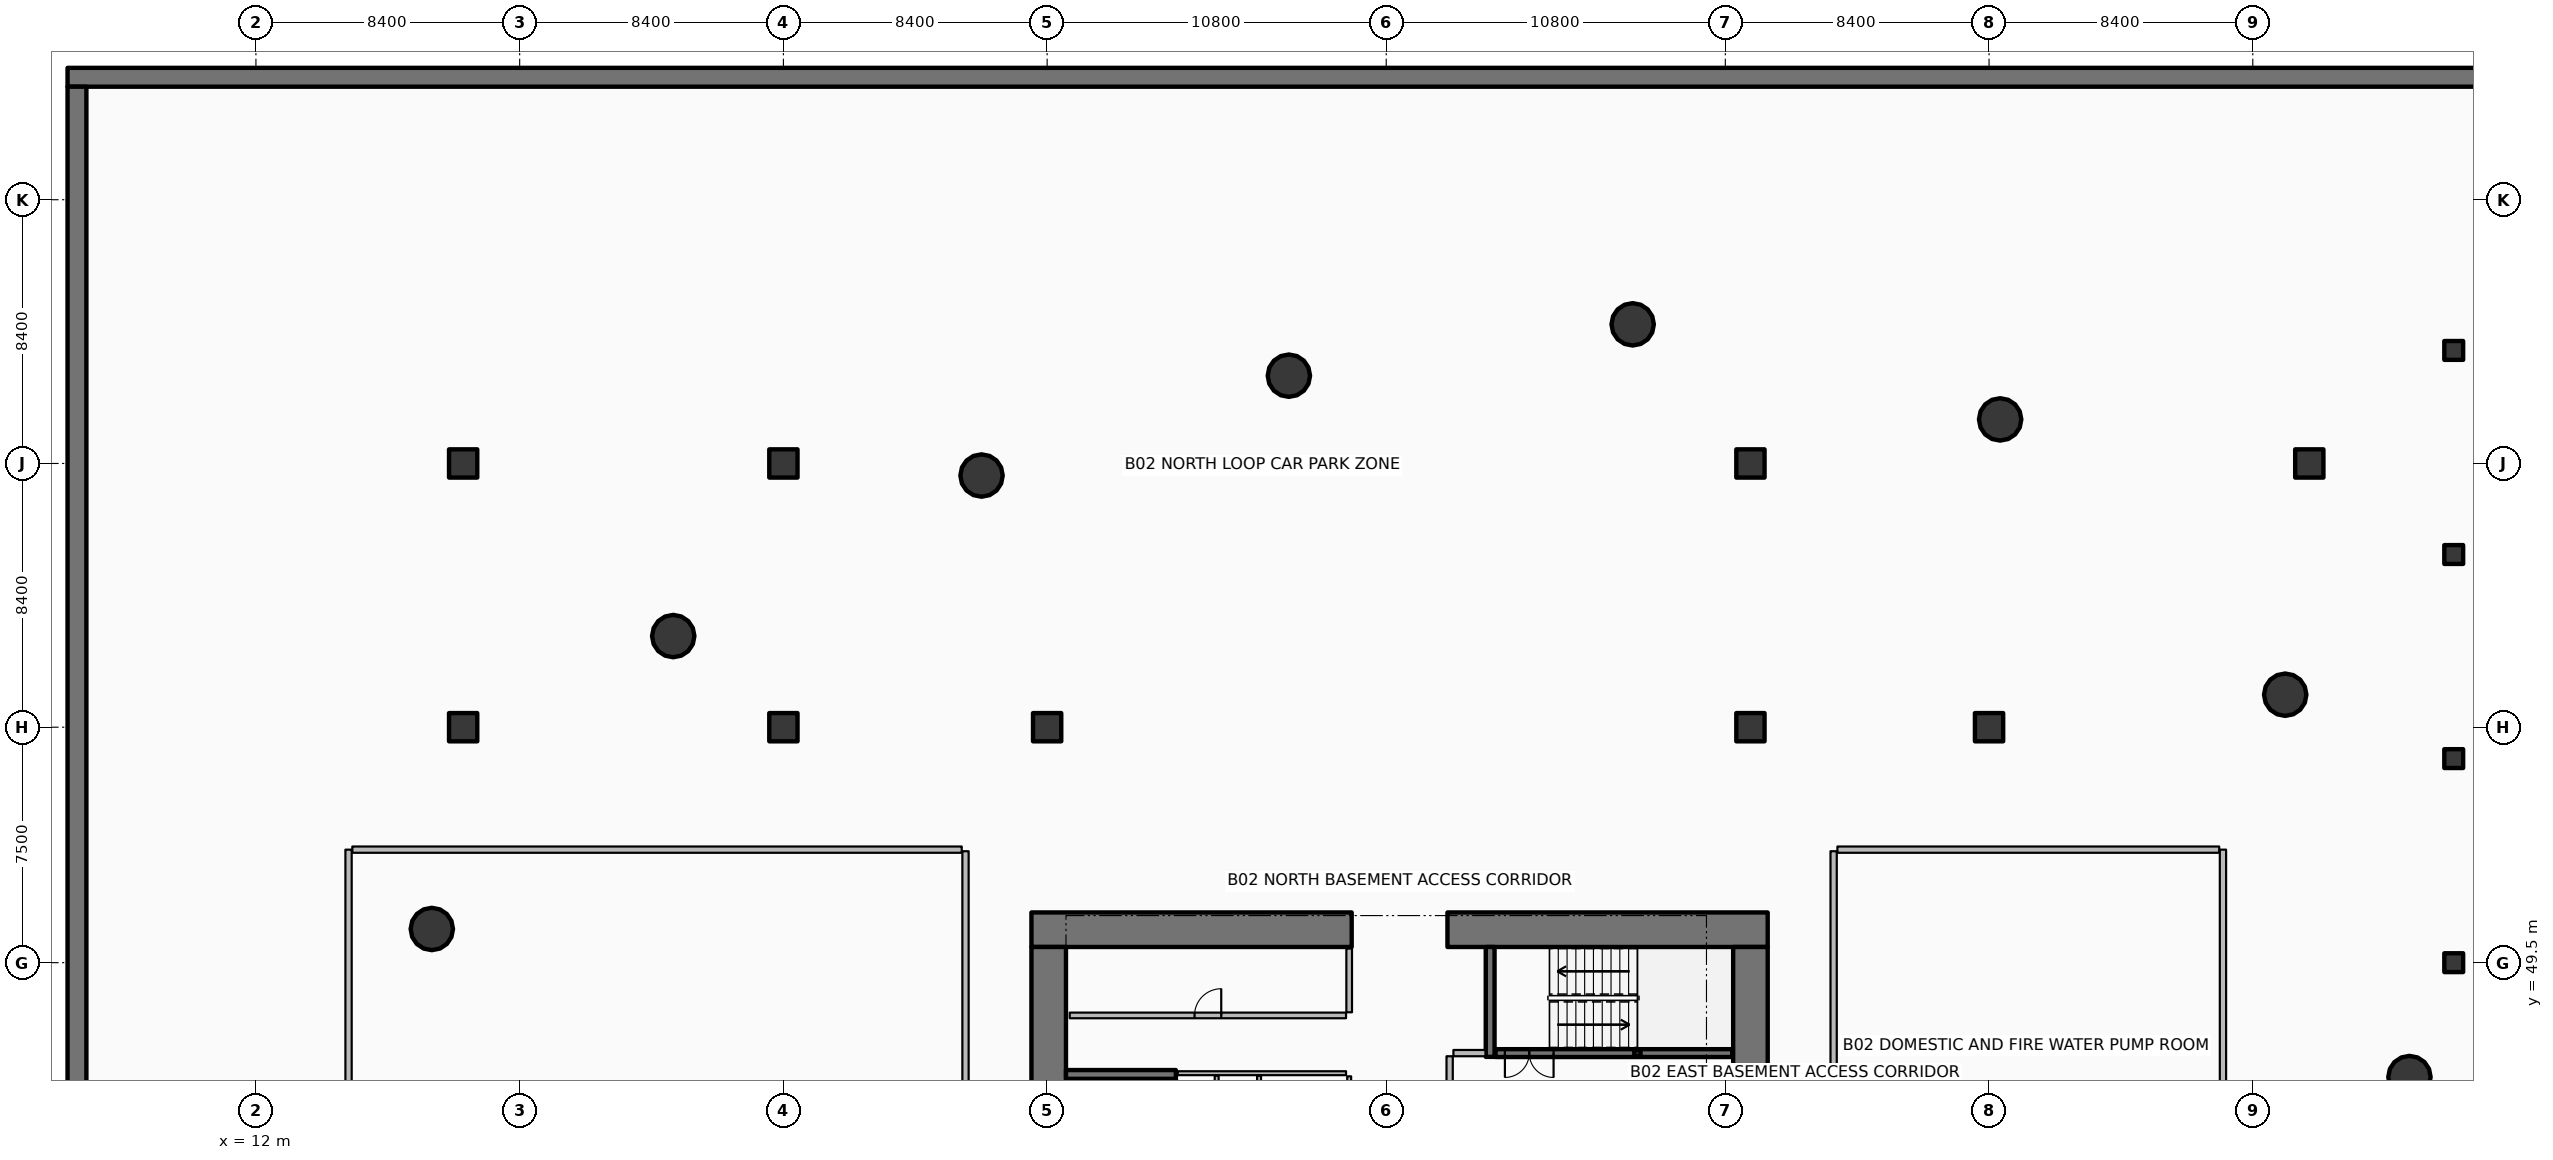
"""IFC4 building model, lengths in metres.
Left out: names, types, materials, properties, quantities, classifications, styles, units other than length and angle.
Written with IfcOpenShell. Run it as: python <this file> out.ifc"""

import sys

from ifc_helpers import new_model, si_unit, direction, frame, frame_2d, origin, origin_2d, place, context, subcontext, project, spatial, rectangle, hollow_rectangle, circle, extrude, element, fill, save


model = new_model("IFC4")
c1 = context("Model", 3, precision=1e-05, world=origin(), true_north=direction((0.0, 1.0)))
c2 = subcontext(c1, "Body", "Model", "MODEL_VIEW")
j1 = project(units=[si_unit("LENGTHUNIT", "METRE"), si_unit("PLANEANGLEUNIT", "RADIAN")], contexts=[c1])
p1 = place(None, origin())
s1 = spatial("IfcSite", under=j1, at=p1, CompositionType="ELEMENT")
p2 = place(p1, origin())
s2 = spatial("IfcBuilding", under=s1, at=p2, CompositionType="ELEMENT")
p3 = place(p2, frame((0.0, 0.0, -7.6)))
s3 = spatial("IfcBuildingStorey", under=s2, at=p3, CompositionType="ELEMENT", Elevation=-7.6)
p4 = place(p3, frame((6.0, 77.7, 0.0), z_axis=(0.0, 0.0, 1.0), x_axis=(1.0, 0.0, 0.0)))
e1 = element("IfcWall", 1, at=p4, inside=s3, PredefinedType="USERDEFINED", context=c2, shape_type="SweptSolid", body=[
    extrude(rectangle(XDim=84.0, YDim=0.6, at=frame_2d((42.0, 0.0))), origin(), (0.0, 0.0, 1.0), 3.8),
])
p5 = place(p3, frame((6.3, 6.6, 0.0), z_axis=(0.0, 0.0, 1.0), x_axis=(0.0, 1.0, 0.0)))
e2 = element("IfcWall", 2, at=p5, inside=s3, PredefinedType="USERDEFINED", context=c2, shape_type="SweptSolid", body=[
    extrude(rectangle(XDim=70.8, YDim=0.6, at=frame_2d((35.4, 0.0))), origin(), (0.0, 0.0, 1.0), 3.8),
])
for number, where, z_axis, x_axis in (
    (3, (18.6, 57.0, 0.0), (0.0, 0.0, 1.0), (1.0, 0.0, 0.0)),
    (4, (18.6, 65.4, 0.0), (0.0, 0.0, 1.0), (1.0, 0.0, 0.0)),
    (5, (28.8, 57.0, 0.0), (0.0, 0.0, 1.0), (1.0, 0.0, 0.0)),
    (6, (28.8, 65.4, 0.0), (0.0, 0.0, 1.0), (1.0, 0.0, 0.0)),
    (7, (37.2, 57.0, 0.0), (0.0, 0.0, 1.0), (1.0, 0.0, 0.0)),
    (8, (59.6, 57.0, 0.0), (0.0, 0.0, 1.0), (1.0, 0.0, 0.0)),
    (9, (59.6, 65.4, 0.0), (0.0, 0.0, 1.0), (1.0, 0.0, 0.0)),
    (10, (67.2, 57.0, 0.0), (0.0, 0.0, 1.0), (1.0, 0.0, 0.0)),
    (11, (77.4, 65.4, 0.0), (0.0, 0.0, 1.0), (1.0, 0.0, 0.0)),
):
    element("IfcColumn", number, at=place(p3, frame(where, z_axis=z_axis, x_axis=x_axis)), inside=s3, PredefinedType="COLUMN", context=c2, shape_type="SweptSolid", body=[
        extrude(rectangle(XDim=0.9, YDim=0.9, at=origin_2d()), origin(), (0.0, 0.0, 1.0), 3.52),
    ])
for number, where, z_axis, x_axis in (
    (12, (82.0, 49.5, 0.0), (0.0, 0.0, 1.0), (1.0, 0.0, 0.0)),
    (13, (82.0, 56.0, 0.0), (0.0, 0.0, 1.0), (1.0, 0.0, 0.0)),
    (14, (82.0, 62.5, 0.0), (0.0, 0.0, 1.0), (1.0, 0.0, 0.0)),
    (15, (82.0, 69.0, 0.0), (0.0, 0.0, 1.0), (1.0, 0.0, 0.0)),
):
    element("IfcColumn", number, at=place(p3, frame(where, z_axis=z_axis, x_axis=x_axis)), inside=s3, PredefinedType="COLUMN", context=c2, shape_type="SweptSolid", body=[
        extrude(rectangle(XDim=0.6, YDim=0.6, at=origin_2d()), origin(), (0.0, 0.0, 1.0), 3.52),
    ])
for number, where, z_axis, x_axis in (
    (16, (36.7, 50.55, 0.0), (0.0, 0.0, 1.0), (1.0, 0.0, 0.0)),
    (17, (49.95, 50.55, 0.0), (0.0, 0.0, 1.0), (1.0, 0.0, 0.0)),
):
    element("IfcWall", number, at=place(p3, frame(where, z_axis=z_axis, x_axis=x_axis)), inside=s3, PredefinedType="SHEAR", context=c2, shape_type="SweptSolid", body=[
        extrude(rectangle(XDim=10.2, YDim=1.1, at=frame_2d((5.1, 0.0))), origin(), (0.0, 0.0, 1.0), 3.8),
    ])
for number, where, z_axis, x_axis in (
    (18, (37.25, 34.0, 0.0), (0.0, 0.0, 1.0), (0.0, 1.0, 0.0)),
    (19, (59.6, 34.0, 0.0), (0.0, 0.0, 1.0), (0.0, 1.0, 0.0)),
):
    element("IfcWall", number, at=place(p3, frame(where, z_axis=z_axis, x_axis=x_axis)), inside=s3, PredefinedType="SHEAR", context=c2, shape_type="SweptSolid", body=[
        extrude(rectangle(XDim=16.0, YDim=1.1, at=frame_2d((8.0, 0.0))), origin(), (0.0, 0.0, 1.0), 3.8),
    ])
for number, where, z_axis, x_axis in (
    (20, (37.8, 45.94, 0.0), (0.0, 0.0, 1.0), (1.0, 0.0, 0.0)),
    (21, (51.31, 46.5, 0.0), (0.0, 0.0, 1.0), (0.0, 1.0, 0.0)),
):
    element("IfcWall", number, at=place(p3, frame(where, z_axis=z_axis, x_axis=x_axis)), inside=s3, PredefinedType="SHEAR", context=c2, shape_type="SweptSolid", body=[
        extrude(rectangle(XDim=3.5, YDim=0.28, at=frame_2d((1.75, 0.0))), origin(), (0.0, 0.0, 1.0), 3.8),
    ])
p6 = place(p3, frame((56.0, 46.62, 0.0), z_axis=(0.0, 0.0, 1.0), x_axis=(1.0, 0.0, 0.0)))
e22 = element("IfcColumn", 22, at=p6, inside=s3, PredefinedType="COLUMN", context=c2, shape_type="SweptSolid", body=[
    extrude(hollow_rectangle(XDim=0.2, YDim=0.2, WallThickness=0.01, InnerFilletRadius=0.01, OuterFilletRadius=0.02, at=origin_2d()), origin(), (0.0, 0.0, 1.0), 1.695),
])
for number, where, z_axis, x_axis in (
    (23, (76.633, 58.035, 0.0), (0.0, 0.0, 1.0), (1.0, 0.0, 0.0)),
    (24, (67.553, 66.803, 0.0), (0.0, 0.0, 1.0), (1.0, 0.0, 0.0)),
    (25, (55.849, 69.831, 0.0), (0.0, 0.0, 1.0), (1.0, 0.0, 0.0)),
    (26, (44.899, 68.196, 0.0), (0.0, 0.0, 1.0), (1.0, 0.0, 0.0)),
    (27, (35.111, 65.016, 0.0), (0.0, 0.0, 1.0), (1.0, 0.0, 0.0)),
    (28, (25.291, 59.902, 0.0), (0.0, 0.0, 1.0), (1.0, 0.0, 0.0)),
    (29, (17.602, 50.573, 0.0), (0.0, 0.0, 1.0), (1.0, 0.0, 0.0)),
    (30, (80.59, 45.857, 0.0), (0.0, 0.0, 1.0), (1.0, 0.0, 0.0)),
):
    element("IfcColumn", number, at=place(p3, frame(where, z_axis=z_axis, x_axis=x_axis)), inside=s3, PredefinedType="COLUMN", context=c2, shape_type="SweptSolid", body=[
        extrude(circle(Radius=0.675, at=origin_2d()), origin(), (0.0, 0.0, 1.0), 3.52),
    ])
p7 = place(p3, frame((41.18, 38.22, 0.0), z_axis=(0.0, 0.0, 1.0), x_axis=(0.0, 1.0, 0.0)))
e31 = element("IfcWall", 31, at=p7, inside=s3, PredefinedType="SOLIDWALL", context=c2, shape_type="SweptSolid", body=[
    extrude(rectangle(XDim=7.56, YDim=0.25, at=frame_2d((3.78, 0.0))), origin(), (0.0, 0.0, 1.0), 3.52),
])
p8 = place(p7, frame((0.3, 0.0, 0.0)))
e32 = element("IfcOpeningElement", 32, at=p8, cuts=e31, PredefinedType="OPENING", context=c2, shape_type="SweptSolid", body=[
    extrude(rectangle(XDim=1.55, YDim=2.15, at=frame_2d((0.775, 1.075))), frame((0.0, 0.135, 0.0), z_axis=(0.0, -1.0, 0.0), x_axis=(1.0, 0.0, 0.0)), (0.0, 0.0, 1.0), 0.27),
])
p9 = place(p3, frame((51.48, 46.62, 0.0), z_axis=(0.0, 0.0, 1.0), x_axis=(1.0, 0.0, 0.0)))
e33 = element("IfcWall", 33, at=p9, inside=s3, PredefinedType="SOLIDWALL", context=c2, shape_type="SweptSolid", body=[
    extrude(rectangle(XDim=7.54, YDim=0.25, at=frame_2d((3.77, 0.0))), origin(), (0.0, 0.0, 1.0), 3.52),
])
p10 = place(p9, frame((0.3, 0.0, 0.0)))
e34 = element("IfcOpeningElement", 34, at=p10, cuts=e33, PredefinedType="OPENING", context=c2, shape_type="SweptSolid", body=[
    extrude(rectangle(XDim=1.55, YDim=2.15, at=frame_2d((0.775, 1.075))), frame((0.0, 0.135, 0.0), z_axis=(0.0, -1.0, 0.0), x_axis=(1.0, 0.0, 0.0)), (0.0, 0.0, 1.0), 0.27),
])
p11 = place(p3, frame((56.62, 46.08, 0.0), z_axis=(0.0, 0.0, 1.0), x_axis=(0.0, -1.0, 0.0)))
e35 = element("IfcWall", 35, at=p11, inside=s3, PredefinedType="PARTITIONING", context=c2, shape_type="SweptSolid", body=[
    extrude(rectangle(XDim=2.46, YDim=0.16, at=frame_2d((1.23, 0.0))), origin(), (0.0, 0.0, 1.0), 3.52),
])
p12 = place(p11, frame((0.68, 0.0, 0.0)))
e36 = element("IfcOpeningElement", 36, at=p12, cuts=e35, PredefinedType="OPENING", context=c2, shape_type="SweptSolid", body=[
    extrude(rectangle(XDim=1.1, YDim=2.1, at=frame_2d((0.55, 1.05))), frame((0.0, 0.09, 0.0), z_axis=(0.0, -1.0, 0.0), x_axis=(1.0, 0.0, 0.0)), (0.0, 0.0, 1.0), 0.18),
])
p13 = place(p3, frame((56.72, 46.08, 0.0), z_axis=(0.0, 0.0, 1.0), x_axis=(1.0, 0.0, 0.0)))
e37 = element("IfcWall", 37, at=p13, inside=s3, PredefinedType="PARTITIONING", context=c2, shape_type="SweptSolid", body=[
    extrude(rectangle(XDim=2.06, YDim=0.16, at=frame_2d((1.03, 0.0))), origin(), (0.0, 0.0, 1.0), 3.52),
])
p14 = place(p3, frame((37.92, 47.82, 0.0), z_axis=(0.0, 0.0, 1.0), x_axis=(1.0, 0.0, 0.0)))
e38 = element("IfcWall", 38, at=p14, inside=s3, PredefinedType="PARTITIONING", context=c2, shape_type="SweptSolid", body=[
    extrude(rectangle(XDim=8.8, YDim=0.18, at=frame_2d((4.4, 0.0))), origin(), (0.0, 0.0, 1.0), 3.52),
])
p15 = place(p14, frame((3.975, 0.0, 0.0)))
e39 = element("IfcOpeningElement", 39, at=p15, cuts=e38, PredefinedType="OPENING", context=c2, shape_type="SweptSolid", body=[
    extrude(rectangle(XDim=0.85, YDim=2.06, at=frame_2d((0.425, 1.03))), frame((0.0, 0.1, 0.0), z_axis=(0.0, -1.0, 0.0), x_axis=(1.0, 0.0, 0.0)), (0.0, 0.0, 1.0), 0.2),
])
p16 = place(p3, frame((46.82, 47.92, 0.0), z_axis=(0.0, 0.0, 1.0), x_axis=(0.0, 1.0, 0.0)))
e40 = element("IfcWall", 40, at=p16, inside=s3, PredefinedType="PARTITIONING", context=c2, shape_type="SweptSolid", body=[
    extrude(rectangle(XDim=2.03, YDim=0.18, at=frame_2d((1.015, 0.0))), origin(), (0.0, 0.0, 1.0), 3.52),
])
p17 = place(p3, frame((50.14, 46.62, 0.0), z_axis=(0.0, 0.0, 1.0), x_axis=(1.0, 0.0, 0.0)))
e41 = element("IfcWall", 41, at=p17, inside=s3, PredefinedType="PARTITIONING", context=c2, shape_type="SweptSolid", body=[
    extrude(rectangle(XDim=1.02, YDim=0.2, at=frame_2d((0.51, 0.0))), origin(), (0.0, 0.0, 1.0), 3.52),
])
p18 = place(p3, frame((50.02, 43.22, 0.0), z_axis=(0.0, 0.0, 1.0), x_axis=(0.0, 1.0, 0.0)))
e42 = element("IfcWall", 42, at=p18, inside=s3, PredefinedType="PARTITIONING", context=c2, shape_type="SweptSolid", body=[
    extrude(rectangle(XDim=3.3, YDim=0.2, at=frame_2d((1.65, 0.0))), origin(), (0.0, 0.0, 1.0), 3.52),
])
p19 = place(p18, frame((1.125, 0.0, 0.0)))
e43 = element("IfcOpeningElement", 43, at=p19, cuts=e42, PredefinedType="OPENING", context=c2, shape_type="SweptSolid", body=[
    extrude(rectangle(XDim=1.05, YDim=2.1, at=frame_2d((0.525, 1.05))), frame((0.0, 0.11, 0.0), z_axis=(0.0, -1.0, 0.0), x_axis=(1.0, 0.0, 0.0)), (0.0, 0.0, 1.0), 0.22),
])
p20 = place(p3, frame((41.36, 45.98, 0.0), z_axis=(0.0, 0.0, 1.0), x_axis=(1.0, 0.0, 0.0)))
e44 = element("IfcWall", 44, at=p20, inside=s3, PredefinedType="PARTITIONING", context=c2, shape_type="SweptSolid", body=[
    extrude(rectangle(XDim=5.36, YDim=0.125, at=frame_2d((2.68, 0.0))), origin(), (0.0, 0.0, 1.0), 2.96),
])
p21 = place(p3, frame((42.6, 44.35, 0.0), z_axis=(0.0, 0.0, 1.0), x_axis=(0.0, 1.0, 0.0)))
e45 = element("IfcWall", 45, at=p21, inside=s3, PredefinedType="PARTITIONING", context=c2, shape_type="SweptSolid", body=[
    extrude(rectangle(XDim=1.55, YDim=0.125, at=frame_2d((0.775, 0.0))), origin(), (0.0, 0.0, 1.0), 2.96),
])
p22 = place(p3, frame((43.95, 41.58, 0.0), z_axis=(0.0, 0.0, 1.0), x_axis=(0.0, 1.0, 0.0)))
e46 = element("IfcWall", 46, at=p22, inside=s3, PredefinedType="PARTITIONING", context=c2, shape_type="SweptSolid", body=[
    extrude(rectangle(XDim=4.32, YDim=0.125, at=frame_2d((2.16, 0.0))), origin(), (0.0, 0.0, 1.0), 2.96),
])
p23 = place(p3, frame((46.82, 41.58, 0.0), z_axis=(0.0, 0.0, 1.0), x_axis=(0.0, 1.0, 0.0)))
e47 = element("IfcWall", 47, at=p23, inside=s3, PredefinedType="PARTITIONING", context=c2, shape_type="SweptSolid", body=[
    extrude(rectangle(XDim=4.3, YDim=0.125, at=frame_2d((2.15, 0.0))), origin(), (0.0, 0.0, 1.0), 2.96),
])
p24 = place(p23, frame((1.725, 0.0, 0.0)))
e48 = element("IfcOpeningElement", 48, at=p24, cuts=e47, PredefinedType="OPENING", context=c2, shape_type="SweptSolid", body=[
    extrude(rectangle(XDim=0.85, YDim=2.06, at=frame_2d((0.425, 1.03))), frame((0.0, 0.073, 0.0), z_axis=(0.0, -1.0, 0.0), x_axis=(1.0, 0.0, 0.0)), (0.0, 0.0, 1.0), 0.145),
])
p25 = place(p3, frame((14.95, 30.9, 0.0), z_axis=(0.0, 0.0, 1.0), x_axis=(0.0, 1.0, 0.0)))
e49 = element("IfcWall", 49, at=p25, inside=s3, PredefinedType="PARTITIONING", context=c2, shape_type="SweptSolid", body=[
    extrude(rectangle(XDim=22.2, YDim=0.2, at=frame_2d((11.1, 0.0))), origin(), (0.0, 0.0, 1.0), 2.96),
])
p26 = place(p3, frame((15.07, 53.1, 0.0), z_axis=(0.0, 0.0, 1.0), x_axis=(1.0, 0.0, 0.0)))
e50 = element("IfcWall", 50, at=p26, inside=s3, PredefinedType="PARTITIONING", context=c2, shape_type="SweptSolid", body=[
    extrude(rectangle(XDim=19.41, YDim=0.2, at=frame_2d((9.705, 0.0))), origin(), (0.0, 0.0, 1.0), 2.811),
])
p27 = place(p3, frame((34.6, 30.95, 0.0), z_axis=(0.0, 0.0, 1.0), x_axis=(0.0, 1.0, 0.0)))
e51 = element("IfcWall", 51, at=p27, inside=s3, PredefinedType="PARTITIONING", context=c2, shape_type="SweptSolid", body=[
    extrude(rectangle(XDim=22.1, YDim=0.2, at=frame_2d((11.05, 0.0))), origin(), (0.0, 0.0, 1.0), 2.811),
])
p28 = place(p27, frame((10.525, 0.0, 0.0)))
e52 = element("IfcOpeningElement", 52, at=p28, cuts=e51, PredefinedType="OPENING", context=c2, shape_type="SweptSolid", body=[
    extrude(rectangle(XDim=1.05, YDim=2.1, at=frame_2d((0.525, 1.05))), frame((0.0, 0.11, 0.0), z_axis=(0.0, -1.0, 0.0), x_axis=(1.0, 0.0, 0.0)), (0.0, 0.0, 1.0), 0.22),
])
p29 = place(p3, frame((74.65, 30.9, 0.0), z_axis=(0.0, 0.0, 1.0), x_axis=(0.0, 1.0, 0.0)))
e53 = element("IfcWall", 53, at=p29, inside=s3, PredefinedType="PARTITIONING", context=c2, shape_type="SweptSolid", body=[
    extrude(rectangle(XDim=22.2, YDim=0.2, at=frame_2d((11.1, 0.0))), origin(), (0.0, 0.0, 1.0), 2.811),
])
p30 = place(p3, frame((62.37, 53.1, 0.0), z_axis=(0.0, 0.0, 1.0), x_axis=(1.0, 0.0, 0.0)))
e54 = element("IfcWall", 54, at=p30, inside=s3, PredefinedType="PARTITIONING", context=c2, shape_type="SweptSolid", body=[
    extrude(rectangle(XDim=12.16, YDim=0.2, at=frame_2d((6.08, 0.0))), origin(), (0.0, 0.0, 1.0), 2.811),
])
p31 = place(p3, frame((62.25, 30.95, 0.0), z_axis=(0.0, 0.0, 1.0), x_axis=(0.0, 1.0, 0.0)))
e55 = element("IfcWall", 55, at=p31, inside=s3, PredefinedType="PARTITIONING", context=c2, shape_type="SweptSolid", body=[
    extrude(rectangle(XDim=22.1, YDim=0.2, at=frame_2d((11.05, 0.0))), origin(), (0.0, 0.0, 1.0), 2.811),
])
p32 = place(p31, frame((10.525, 0.0, 0.0)))
e56 = element("IfcOpeningElement", 56, at=p32, cuts=e55, PredefinedType="OPENING", context=c2, shape_type="SweptSolid", body=[
    extrude(rectangle(XDim=1.05, YDim=2.1, at=frame_2d((0.525, 1.05))), frame((0.0, 0.11, 0.0), z_axis=(0.0, -1.0, 0.0), x_axis=(1.0, 0.0, 0.0)), (0.0, 0.0, 1.0), 0.22),
])
p33 = place(p10, origin())
e57 = element("IfcDoor", 57, at=p33, inside=s3, OperationType="DOUBLE_DOOR_SINGLE_SWING", PredefinedType="DOOR", context=c2, shape_type="SweptSolid", body=[
    extrude(rectangle(XDim=1.55, YDim=2.15, at=frame_2d((0.775, 1.075))), frame((0.0, 0.025, 0.0), z_axis=(0.0, -1.0, 0.0), x_axis=(1.0, 0.0, 0.0)), (0.0, 0.0, 1.0), 0.05),
])
fill(e34, e57)
p34 = place(p15, origin())
e58 = element("IfcDoor", 58, at=p34, inside=s3, OperationType="SINGLE_SWING_RIGHT", PredefinedType="DOOR", context=c2, shape_type="SweptSolid", body=[
    extrude(rectangle(XDim=0.85, YDim=2.06, at=frame_2d((0.425, 1.03))), frame((0.0, 0.025, 0.0), z_axis=(0.0, -1.0, 0.0), x_axis=(1.0, 0.0, 0.0)), (0.0, 0.0, 1.0), 0.05),
])
fill(e39, e58)
save(model, sys.argv[1])
